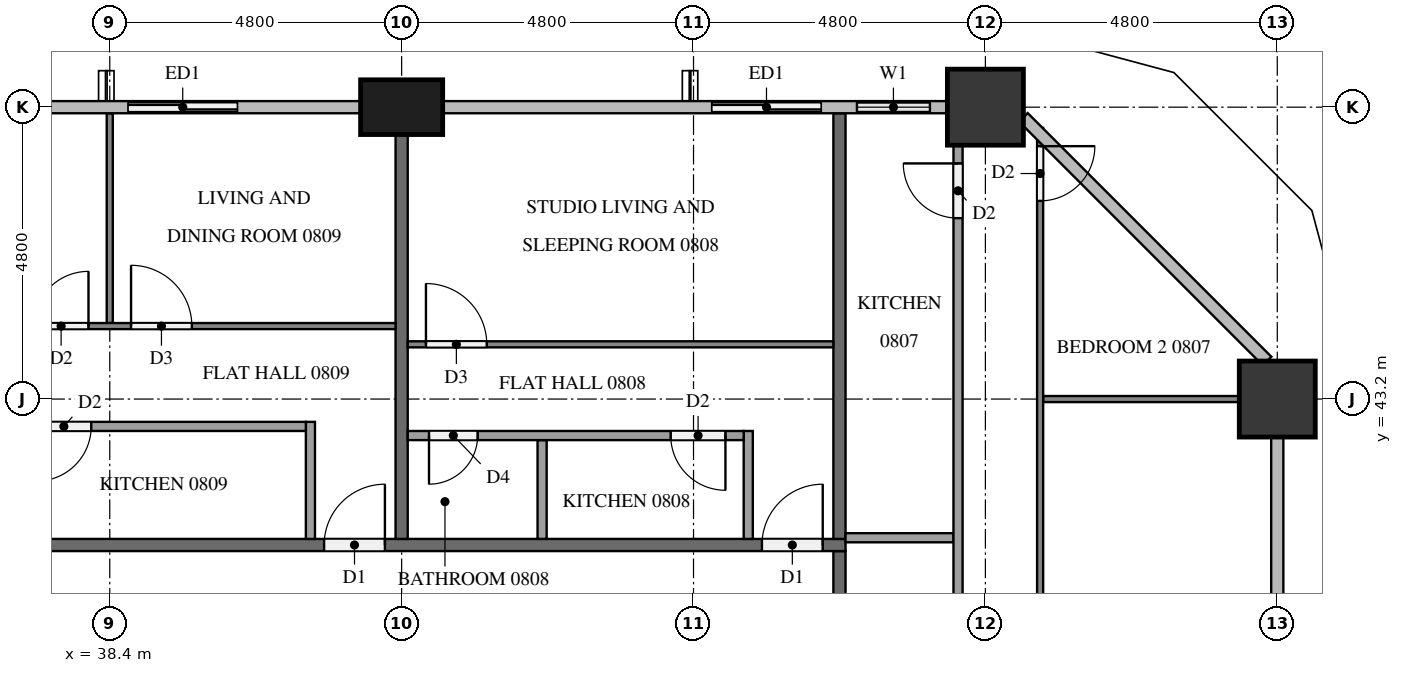
"""IFC4 building model, lengths in metres.
Left out: names, types, materials, properties, quantities, classifications, styles, units other than length and angle.
Written with IfcOpenShell. Run it as: python <this file> out.ifc"""

import sys

from ifc_helpers import new_model, si_unit, direction, frame, frame_2d, origin, origin_2d, place, context, subcontext, project, spatial, rectangle, extrude, element, fill, save


model = new_model("IFC4")
c1 = context("Model", 3, precision=1e-05, world=origin(), true_north=direction((0.0, 1.0)))
c2 = subcontext(c1, "Body", "Model", "MODEL_VIEW")
j1 = project(units=[si_unit("LENGTHUNIT", "METRE"), si_unit("PLANEANGLEUNIT", "RADIAN")], contexts=[c1])
p1 = place(None, origin())
s1 = spatial("IfcSite", under=j1, at=p1, CompositionType="ELEMENT")
p2 = place(p1, origin())
s2 = spatial("IfcBuilding", under=s1, at=p2, CompositionType="ELEMENT")
p3 = place(p2, frame((0.0, 0.0, 36.4)))
s3 = spatial("IfcBuildingStorey", under=s2, at=p3, CompositionType="ELEMENT", Elevation=36.4)
for number, where, z_axis, x_axis in (
    (1, (57.6, 43.2, 0.0), (0.0, 0.0, 1.0), (1.0, 0.0, 0.0)),
    (2, (52.8, 48.0, 0.0), (0.0, 0.0, 1.0), (1.0, 0.0, 0.0)),
):
    element("IfcColumn", number, at=place(p3, frame(where, z_axis=z_axis, x_axis=x_axis)), inside=s3, PredefinedType="COLUMN", context=c2, shape_type="SweptSolid", body=[
        extrude(rectangle(XDim=1.25, YDim=1.25, at=origin_2d()), origin(), (0.0, 0.0, 1.0), 3.2),
    ])
p4 = place(p3, frame((43.2, 48.0, 0.0), z_axis=(0.0, 0.0, 1.0), x_axis=(1.0, 0.0, 0.0)))
e3 = element("IfcColumn", 3, at=p4, inside=s3, PredefinedType="COLUMN", context=c2, shape_type="SweptSolid", body=[
    extrude(rectangle(XDim=1.35, YDim=0.9, at=origin_2d()), origin(), (0.0, 0.0, 1.0), 3.2),
])
p5 = place(p3, frame((52.175, 48.0, 0.0), z_axis=(0.0, 0.0, 1.0), x_axis=(-1.0, 0.0, 0.0)))
e4 = element("IfcWall", 4, at=p5, inside=s3, PredefinedType="SOLIDWALL", context=c2, shape_type="SweptSolid", body=[
    extrude(rectangle(XDim=4.175, YDim=0.15, at=frame_2d((2.087, 0.0))), origin(), (0.0, 0.0, 1.0), 3.2),
])
p6 = place(p5, frame((0.288, 0.0, 0.9)))
e5 = element("IfcOpeningElement", 5, at=p6, cuts=e4, PredefinedType="OPENING", context=c2, shape_type="SweptSolid", body=[
    extrude(rectangle(XDim=1.2, YDim=1.4, at=frame_2d((0.6, 0.7))), frame((0.0, 0.085, 0.0), z_axis=(0.0, -1.0, 0.0), x_axis=(1.0, 0.0, 0.0)), (0.0, 0.0, 1.0), 0.17),
])
p7 = place(p5, frame((2.075, 0.0, 0.0)))
e6 = element("IfcOpeningElement", 6, at=p7, cuts=e4, PredefinedType="OPENING", context=c2, shape_type="SweptSolid", body=[
    extrude(rectangle(XDim=1.8, YDim=2.4, at=frame_2d((0.9, 1.2))), frame((0.0, 0.085, 0.0), z_axis=(0.0, -1.0, 0.0), x_axis=(1.0, 0.0, 0.0)), (0.0, 0.0, 1.0), 0.17),
])
p8 = place(p3, frame((40.8, 48.0, 0.0), z_axis=(0.0, 0.0, 1.0), x_axis=(-1.0, 0.0, 0.0)))
e7 = element("IfcWall", 7, at=p8, inside=s3, PredefinedType="SOLIDWALL", context=c2, shape_type="SweptSolid", body=[
    extrude(rectangle(XDim=2.4, YDim=0.15, at=frame_2d((1.2, 0.0))), origin(), (0.0, 0.0, 1.0), 3.2),
])
p9 = place(p8, frame((0.3, 0.0, 0.0)))
e8 = element("IfcOpeningElement", 8, at=p9, cuts=e7, PredefinedType="OPENING", context=c2, shape_type="SweptSolid", body=[
    extrude(rectangle(XDim=1.8, YDim=2.4, at=frame_2d((0.9, 1.2))), frame((0.0, 0.085, 0.0), z_axis=(0.0, -1.0, 0.0), x_axis=(1.0, 0.0, 0.0)), (0.0, 0.0, 1.0), 0.17),
])
p10 = place(p3, frame((50.4, 40.7, 0.0), z_axis=(0.0, 0.0, 1.0), x_axis=(0.0, -1.0, 0.0)))
e9 = element("IfcWall", 9, at=p10, inside=s3, PredefinedType="PARTITIONING", context=c2, shape_type="SweptSolid", body=[
    extrude(rectangle(XDim=28.6, YDim=0.2, at=frame_2d((14.3, 0.0))), origin(), (0.0, 0.0, 1.0), 3.2),
])
p11 = place(p10, frame((27.375, 0.0, 0.0)))
e10 = element("IfcOpeningElement", 10, at=p11, cuts=e9, PredefinedType="OPENING", context=c2, shape_type="SweptSolid", body=[
    extrude(rectangle(XDim=1.1, YDim=2.1, at=frame_2d((0.55, 1.05))), frame((0.0, 0.11, 0.0), z_axis=(0.0, -1.0, 0.0), x_axis=(1.0, 0.0, 0.0)), (0.0, 0.0, 1.0), 0.22),
])
p12 = place(p10, frame((8.225, 0.0, 0.0)))
e11 = element("IfcOpeningElement", 11, at=p12, cuts=e9, PredefinedType="OPENING", context=c2, shape_type="SweptSolid", body=[
    extrude(rectangle(XDim=1.0, YDim=2.1, at=frame_2d((0.5, 1.05))), frame((0.0, 0.11, 0.0), z_axis=(0.0, -1.0, 0.0), x_axis=(1.0, 0.0, 0.0)), (0.0, 0.0, 1.0), 0.22),
])
p13 = place(p3, frame((11.9, 40.8, 0.0), z_axis=(0.0, 0.0, 1.0), x_axis=(1.0, 0.0, 0.0)))
e12 = element("IfcWall", 12, at=p13, inside=s3, PredefinedType="PARTITIONING", context=c2, shape_type="SweptSolid", body=[
    extrude(rectangle(XDim=38.6, YDim=0.2, at=frame_2d((19.3, 0.0))), origin(), (0.0, 0.0, 1.0), 3.2),
])
p14 = place(p13, frame((37.225, 0.0, 0.0)))
e13 = element("IfcOpeningElement", 13, at=p14, cuts=e12, PredefinedType="OPENING", context=c2, shape_type="SweptSolid", body=[
    extrude(rectangle(XDim=1.0, YDim=2.1, at=frame_2d((0.5, 1.05))), frame((0.0, 0.11, 0.0), z_axis=(0.0, -1.0, 0.0), x_axis=(1.0, 0.0, 0.0)), (0.0, 0.0, 1.0), 0.22),
])
p15 = place(p13, frame((30.025, 0.0, 0.0)))
e14 = element("IfcOpeningElement", 14, at=p15, cuts=e12, PredefinedType="OPENING", context=c2, shape_type="SweptSolid", body=[
    extrude(rectangle(XDim=1.0, YDim=2.1, at=frame_2d((0.5, 1.05))), frame((0.0, 0.11, 0.0), z_axis=(0.0, -1.0, 0.0), x_axis=(1.0, 0.0, 0.0)), (0.0, 0.0, 1.0), 0.22),
])
p16 = place(p13, frame((2.725, 0.0, 0.0)))
e15 = element("IfcOpeningElement", 15, at=p16, cuts=e12, PredefinedType="OPENING", context=c2, shape_type="SweptSolid", body=[
    extrude(rectangle(XDim=1.1, YDim=2.1, at=frame_2d((0.55, 1.05))), frame((0.0, 0.11, 0.0), z_axis=(0.0, -1.0, 0.0), x_axis=(1.0, 0.0, 0.0)), (0.0, 0.0, 1.0), 0.22),
])
p17 = place(p13, frame((1.225, 0.0, 0.0)))
e16 = element("IfcOpeningElement", 16, at=p17, cuts=e12, PredefinedType="OPENING", context=c2, shape_type="SweptSolid", body=[
    extrude(rectangle(XDim=1.0, YDim=2.1, at=frame_2d((0.5, 1.05))), frame((0.0, 0.11, 0.0), z_axis=(0.0, -1.0, 0.0), x_axis=(1.0, 0.0, 0.0)), (0.0, 0.0, 1.0), 0.22),
])
p18 = place(p3, frame((50.4, 40.9, 0.0), z_axis=(0.0, 0.0, 1.0), x_axis=(0.0, 1.0, 0.0)))
e17 = element("IfcWall", 17, at=p18, inside=s3, PredefinedType="PARTITIONING", context=c2, shape_type="SweptSolid", body=[
    extrude(rectangle(XDim=7.0, YDim=0.2, at=frame_2d((3.5, 0.0))), origin(), (0.0, 0.0, 1.0), 3.2),
])
p19 = place(p3, frame((43.2, 47.55, 0.0), z_axis=(0.0, 0.0, 1.0), x_axis=(0.0, -1.0, 0.0)))
e18 = element("IfcWall", 18, at=p19, inside=s3, PredefinedType="PARTITIONING", context=c2, shape_type="SweptSolid", body=[
    extrude(rectangle(XDim=6.65, YDim=0.2, at=frame_2d((3.325, 0.0))), origin(), (0.0, 0.0, 1.0), 3.2),
])
p20 = place(p3, frame((53.75, 43.2, 0.0), z_axis=(0.0, 0.0, 1.0), x_axis=(1.0, 0.0, 0.0)))
e19 = element("IfcWall", 19, at=p20, inside=s3, PredefinedType="PARTITIONING", context=c2, shape_type="SweptSolid", body=[
    extrude(rectangle(XDim=3.225, YDim=0.1, at=frame_2d((1.613, 0.0))), origin(), (0.0, 0.0, 1.0), 3.2),
])
p21 = place(p3, frame((53.7, 47.659, 0.0), z_axis=(0.0, 0.0, 1.0), x_axis=(0.0, -1.0, 0.0)))
e20 = element("IfcWall", 20, at=p21, inside=s3, PredefinedType="PARTITIONING", context=c2, shape_type="SweptSolid", body=[
    extrude(rectangle(XDim=16.359, YDim=0.1, at=frame_2d((8.179, 0.0))), origin(), (0.0, 0.0, 1.0), 3.2),
])
p22 = place(p21, frame((12.009, 0.0, 0.0)))
e21 = element("IfcOpeningElement", 21, at=p22, cuts=e20, PredefinedType="OPENING", context=c2, shape_type="SweptSolid", body=[
    extrude(rectangle(XDim=0.9, YDim=2.1, at=frame_2d((0.45, 1.05))), frame((0.0, 0.06, 0.0), z_axis=(0.0, -1.0, 0.0), x_axis=(1.0, 0.0, 0.0)), (0.0, 0.0, 1.0), 0.12),
])
p23 = place(p21, frame((10.309, 0.0, 0.0)))
e22 = element("IfcOpeningElement", 22, at=p23, cuts=e20, PredefinedType="OPENING", context=c2, shape_type="SweptSolid", body=[
    extrude(rectangle(XDim=1.0, YDim=2.1, at=frame_2d((0.5, 1.05))), frame((0.0, 0.06, 0.0), z_axis=(0.0, -1.0, 0.0), x_axis=(1.0, 0.0, 0.0)), (0.0, 0.0, 1.0), 0.12),
])
p24 = place(p21, frame((0.3, 0.0, 0.0)))
e23 = element("IfcOpeningElement", 23, at=p24, cuts=e20, PredefinedType="OPENING", context=c2, shape_type="SweptSolid", body=[
    extrude(rectangle(XDim=0.9, YDim=2.1, at=frame_2d((0.45, 1.05))), frame((0.0, 0.06, 0.0), z_axis=(0.0, -1.0, 0.0), x_axis=(1.0, 0.0, 0.0)), (0.0, 0.0, 1.0), 0.12),
])
p25 = place(p3, frame((50.5, 40.919, 0.0), z_axis=(0.0, 0.0, 1.0), x_axis=(1.0, 0.0, 0.0)))
e24 = element("IfcWall", 24, at=p25, inside=s3, PredefinedType="PARTITIONING", context=c2, shape_type="SweptSolid", body=[
    extrude(rectangle(XDim=1.775, YDim=0.15, at=frame_2d((0.887, 0.0))), origin(), (0.0, 0.0, 1.0), 3.2),
])
p26 = place(p3, frame((52.35, 32.775, 0.0), z_axis=(0.0, 0.0, 1.0), x_axis=(0.0, 1.0, 0.0)))
e25 = element("IfcWall", 25, at=p26, inside=s3, PredefinedType="PARTITIONING", context=c2, shape_type="SweptSolid", body=[
    extrude(rectangle(XDim=14.6, YDim=0.15, at=frame_2d((7.3, 0.0))), origin(), (0.0, 0.0, 1.0), 3.2),
])
p27 = place(p26, frame((3.429, 0.0, 0.0)))
e26 = element("IfcOpeningElement", 26, at=p27, cuts=e25, PredefinedType="OPENING", context=c2, shape_type="SweptSolid", body=[
    extrude(rectangle(XDim=0.9, YDim=2.1, at=frame_2d((0.45, 1.05))), frame((0.0, 0.085, 0.0), z_axis=(0.0, -1.0, 0.0), x_axis=(1.0, 0.0, 0.0)), (0.0, 0.0, 1.0), 0.17),
])
p28 = place(p26, frame((4.979, 0.0, 0.0)))
e27 = element("IfcOpeningElement", 27, at=p28, cuts=e25, PredefinedType="OPENING", context=c2, shape_type="SweptSolid", body=[
    extrude(rectangle(XDim=0.8, YDim=2.1, at=frame_2d((0.4, 1.05))), frame((0.0, 0.085, 0.0), z_axis=(0.0, -1.0, 0.0), x_axis=(1.0, 0.0, 0.0)), (0.0, 0.0, 1.0), 0.17),
])
p29 = place(p26, frame((13.4, 0.0, 0.0)))
e28 = element("IfcOpeningElement", 28, at=p29, cuts=e25, PredefinedType="OPENING", context=c2, shape_type="SweptSolid", body=[
    extrude(rectangle(XDim=0.9, YDim=2.1, at=frame_2d((0.45, 1.05))), frame((0.0, 0.085, 0.0), z_axis=(0.0, -1.0, 0.0), x_axis=(1.0, 0.0, 0.0)), (0.0, 0.0, 1.0), 0.17),
])
p30 = place(p3, frame((43.3, 44.1, 0.0), z_axis=(0.0, 0.0, 1.0), x_axis=(1.0, 0.0, 0.0)))
e29 = element("IfcWall", 29, at=p30, inside=s3, PredefinedType="PARTITIONING", context=c2, shape_type="SweptSolid", body=[
    extrude(rectangle(XDim=7.0, YDim=0.1, at=frame_2d((3.5, 0.0))), origin(), (0.0, 0.0, 1.0), 3.2),
])
p31 = place(p30, frame((0.3, 0.0, 0.0)))
e30 = element("IfcOpeningElement", 30, at=p31, cuts=e29, PredefinedType="OPENING", context=c2, shape_type="SweptSolid", body=[
    extrude(rectangle(XDim=1.0, YDim=2.1, at=frame_2d((0.5, 1.05))), frame((0.0, 0.06, 0.0), z_axis=(0.0, -1.0, 0.0), x_axis=(1.0, 0.0, 0.0)), (0.0, 0.0, 1.0), 0.12),
])
p32 = place(p3, frame((45.51, 40.9, 0.0), z_axis=(0.0, 0.0, 1.0), x_axis=(0.0, 1.0, 0.0)))
e31 = element("IfcWall", 31, at=p32, inside=s3, PredefinedType="PARTITIONING", context=c2, shape_type="SweptSolid", body=[
    extrude(rectangle(XDim=1.625, YDim=0.15, at=frame_2d((0.812, 0.0))), origin(), (0.0, 0.0, 1.0), 3.2),
])
p33 = place(p3, frame((48.9, 40.9, 0.0), z_axis=(0.0, 0.0, 1.0), x_axis=(0.0, 1.0, 0.0)))
e32 = element("IfcWall", 32, at=p33, inside=s3, PredefinedType="PARTITIONING", context=c2, shape_type="SweptSolid", body=[
    extrude(rectangle(XDim=1.775, YDim=0.15, at=frame_2d((0.888, 0.0))), origin(), (0.0, 0.0, 1.0), 3.2),
])
p34 = place(p3, frame((48.825, 42.6, 0.0), z_axis=(0.0, 0.0, 1.0), x_axis=(-1.0, 0.0, 0.0)))
e33 = element("IfcWall", 33, at=p34, inside=s3, PredefinedType="PARTITIONING", context=c2, shape_type="SweptSolid", body=[
    extrude(rectangle(XDim=5.525, YDim=0.15, at=frame_2d((2.762, 0.0))), origin(), (0.0, 0.0, 1.0), 3.2),
])
p35 = place(p34, frame((0.3, 0.0, 0.0)))
e34 = element("IfcOpeningElement", 34, at=p35, cuts=e33, PredefinedType="OPENING", context=c2, shape_type="SweptSolid", body=[
    extrude(rectangle(XDim=0.9, YDim=2.1, at=frame_2d((0.45, 1.05))), frame((0.0, 0.085, 0.0), z_axis=(0.0, -1.0, 0.0), x_axis=(1.0, 0.0, 0.0)), (0.0, 0.0, 1.0), 0.17),
])
p36 = place(p34, frame((4.375, 0.0, 0.0)))
e35 = element("IfcOpeningElement", 35, at=p36, cuts=e33, PredefinedType="OPENING", context=c2, shape_type="SweptSolid", body=[
    extrude(rectangle(XDim=0.8, YDim=2.1, at=frame_2d((0.4, 1.05))), frame((0.0, 0.085, 0.0), z_axis=(0.0, -1.0, 0.0), x_axis=(1.0, 0.0, 0.0)), (0.0, 0.0, 1.0), 0.17),
])
p37 = place(p3, frame((38.4, 44.45, 0.0), z_axis=(0.0, 0.0, 1.0), x_axis=(0.0, 1.0, 0.0)))
e36 = element("IfcWall", 36, at=p37, inside=s3, PredefinedType="PARTITIONING", context=c2, shape_type="SweptSolid", body=[
    extrude(rectangle(XDim=3.45, YDim=0.1, at=frame_2d((1.725, 0.0))), origin(), (0.0, 0.0, 1.0), 3.2),
])
p38 = place(p3, frame((33.7, 44.4, 0.0), z_axis=(0.0, 0.0, 1.0), x_axis=(1.0, 0.0, 0.0)))
e37 = element("IfcWall", 37, at=p38, inside=s3, PredefinedType="PARTITIONING", context=c2, shape_type="SweptSolid", body=[
    extrude(rectangle(XDim=9.4, YDim=0.1, at=frame_2d((4.7, 0.0))), origin(), (0.0, 0.0, 1.0), 3.2),
])
p39 = place(p38, frame((5.05, 0.0, 0.0)))
e38 = element("IfcOpeningElement", 38, at=p39, cuts=e37, PredefinedType="OPENING", context=c2, shape_type="SweptSolid", body=[
    extrude(rectangle(XDim=1.0, YDim=2.1, at=frame_2d((0.5, 1.05))), frame((0.0, 0.06, 0.0), z_axis=(0.0, -1.0, 0.0), x_axis=(1.0, 0.0, 0.0)), (0.0, 0.0, 1.0), 0.12),
])
p40 = place(p38, frame((3.45, 0.0, 0.0)))
e39 = element("IfcOpeningElement", 39, at=p40, cuts=e37, PredefinedType="OPENING", context=c2, shape_type="SweptSolid", body=[
    extrude(rectangle(XDim=0.9, YDim=2.1, at=frame_2d((0.45, 1.05))), frame((0.0, 0.06, 0.0), z_axis=(0.0, -1.0, 0.0), x_axis=(1.0, 0.0, 0.0)), (0.0, 0.0, 1.0), 0.12),
])
p41 = place(p3, frame((41.7, 40.9, 0.0), z_axis=(0.0, 0.0, 1.0), x_axis=(0.0, 1.0, 0.0)))
e40 = element("IfcWall", 40, at=p41, inside=s3, PredefinedType="PARTITIONING", context=c2, shape_type="SweptSolid", body=[
    extrude(rectangle(XDim=1.925, YDim=0.15, at=frame_2d((0.962, 0.0))), origin(), (0.0, 0.0, 1.0), 3.2),
])
p42 = place(p3, frame((41.625, 42.75, 0.0), z_axis=(0.0, 0.0, 1.0), x_axis=(-1.0, 0.0, 0.0)))
e41 = element("IfcWall", 41, at=p42, inside=s3, PredefinedType="PARTITIONING", context=c2, shape_type="SweptSolid", body=[
    extrude(rectangle(XDim=7.925, YDim=0.15, at=frame_2d((3.962, 0.0))), origin(), (0.0, 0.0, 1.0), 3.2),
])
p43 = place(p42, frame((3.53, 0.0, 0.0)))
e42 = element("IfcOpeningElement", 42, at=p43, cuts=e41, PredefinedType="OPENING", context=c2, shape_type="SweptSolid", body=[
    extrude(rectangle(XDim=0.9, YDim=2.1, at=frame_2d((0.45, 1.05))), frame((0.0, 0.085, 0.0), z_axis=(0.0, -1.0, 0.0), x_axis=(1.0, 0.0, 0.0)), (0.0, 0.0, 1.0), 0.17),
])
p44 = place(p42, frame((5.08, 0.0, 0.0)))
e43 = element("IfcOpeningElement", 43, at=p44, cuts=e41, PredefinedType="OPENING", context=c2, shape_type="SweptSolid", body=[
    extrude(rectangle(XDim=0.8, YDim=2.1, at=frame_2d((0.4, 1.05))), frame((0.0, 0.085, 0.0), z_axis=(0.0, -1.0, 0.0), x_axis=(1.0, 0.0, 0.0)), (0.0, 0.0, 1.0), 0.17),
])
p45 = place(p6, origin())
e44 = element("IfcWindow", 44, at=p45, inside=s3, PartitioningType="SINGLE_PANEL", PredefinedType="WINDOW", context=c2, shape_type="SweptSolid", body=[
    extrude(rectangle(XDim=1.2, YDim=1.4, at=frame_2d((0.6, 0.7))), frame((0.0, 0.03, 0.0), z_axis=(0.0, -1.0, 0.0), x_axis=(1.0, 0.0, 0.0)), (0.0, 0.0, 1.0), 0.06),
])
fill(e5, e44)
p46 = place(p7, origin())
e45 = element("IfcDoor", 45, at=p46, inside=s3, OperationType="SLIDING_TO_LEFT", PredefinedType="DOOR", context=c2, shape_type="SweptSolid", body=[
    extrude(rectangle(XDim=1.8, YDim=2.4, at=frame_2d((0.9, 1.2))), frame((0.0, 0.025, 0.0), z_axis=(0.0, -1.0, 0.0), x_axis=(1.0, 0.0, 0.0)), (0.0, 0.0, 1.0), 0.05),
])
fill(e6, e45)
p47 = place(p9, origin())
e46 = element("IfcDoor", 46, at=p47, inside=s3, OperationType="SLIDING_TO_RIGHT", PredefinedType="DOOR", context=c2, shape_type="SweptSolid", body=[
    extrude(rectangle(XDim=1.8, YDim=2.4, at=frame_2d((0.9, 1.2))), frame((0.0, 0.025, 0.0), z_axis=(0.0, -1.0, 0.0), x_axis=(1.0, 0.0, 0.0)), (0.0, 0.0, 1.0), 0.05),
])
fill(e8, e46)
p48 = place(p14, origin())
e47 = element("IfcDoor", 47, at=p48, inside=s3, OperationType="SINGLE_SWING_RIGHT", PredefinedType="DOOR", context=c2, shape_type="SweptSolid", body=[
    extrude(rectangle(XDim=1.0, YDim=2.1, at=frame_2d((0.5, 1.05))), frame((0.0, 0.025, 0.0), z_axis=(0.0, -1.0, 0.0), x_axis=(1.0, 0.0, 0.0)), (0.0, 0.0, 1.0), 0.05),
])
fill(e13, e47)
p49 = place(p15, origin())
e48 = element("IfcDoor", 48, at=p49, inside=s3, OperationType="SINGLE_SWING_RIGHT", PredefinedType="DOOR", context=c2, shape_type="SweptSolid", body=[
    extrude(rectangle(XDim=1.0, YDim=2.1, at=frame_2d((0.5, 1.05))), frame((0.0, 0.025, 0.0), z_axis=(0.0, -1.0, 0.0), x_axis=(1.0, 0.0, 0.0)), (0.0, 0.0, 1.0), 0.05),
])
fill(e14, e48)
p50 = place(p24, origin())
e49 = element("IfcDoor", 49, at=p50, inside=s3, OperationType="SINGLE_SWING_LEFT", PredefinedType="DOOR", context=c2, shape_type="SweptSolid", body=[
    extrude(rectangle(XDim=0.9, YDim=2.1, at=frame_2d((0.45, 1.05))), frame((0.0, 0.025, 0.0), z_axis=(0.0, -1.0, 0.0), x_axis=(1.0, 0.0, 0.0)), (0.0, 0.0, 1.0), 0.05),
])
fill(e23, e49)
p51 = place(p29, origin())
e50 = element("IfcDoor", 50, at=p51, inside=s3, OperationType="SINGLE_SWING_RIGHT", PredefinedType="DOOR", context=c2, shape_type="SweptSolid", body=[
    extrude(rectangle(XDim=0.9, YDim=2.1, at=frame_2d((0.45, 1.05))), frame((0.0, 0.025, 0.0), z_axis=(0.0, -1.0, 0.0), x_axis=(1.0, 0.0, 0.0)), (0.0, 0.0, 1.0), 0.05),
])
fill(e28, e50)
p52 = place(p31, origin())
e51 = element("IfcDoor", 51, at=p52, inside=s3, OperationType="SINGLE_SWING_LEFT", PredefinedType="DOOR", context=c2, shape_type="SweptSolid", body=[
    extrude(rectangle(XDim=1.0, YDim=2.1, at=frame_2d((0.5, 1.05))), frame((0.0, 0.025, 0.0), z_axis=(0.0, -1.0, 0.0), x_axis=(1.0, 0.0, 0.0)), (0.0, 0.0, 1.0), 0.05),
])
fill(e30, e51)
p53 = place(p35, origin())
e52 = element("IfcDoor", 52, at=p53, inside=s3, OperationType="SINGLE_SWING_LEFT", PredefinedType="DOOR", context=c2, shape_type="SweptSolid", body=[
    extrude(rectangle(XDim=0.9, YDim=2.1, at=frame_2d((0.45, 1.05))), frame((0.0, 0.025, 0.0), z_axis=(0.0, -1.0, 0.0), x_axis=(1.0, 0.0, 0.0)), (0.0, 0.0, 1.0), 0.05),
])
fill(e34, e52)
p54 = place(p36, origin())
e53 = element("IfcDoor", 53, at=p54, inside=s3, OperationType="SINGLE_SWING_RIGHT", PredefinedType="DOOR", context=c2, shape_type="SweptSolid", body=[
    extrude(rectangle(XDim=0.8, YDim=2.1, at=frame_2d((0.4, 1.05))), frame((0.0, 0.025, 0.0), z_axis=(0.0, -1.0, 0.0), x_axis=(1.0, 0.0, 0.0)), (0.0, 0.0, 1.0), 0.05),
])
fill(e35, e53)
p55 = place(p39, origin())
e54 = element("IfcDoor", 54, at=p55, inside=s3, OperationType="SINGLE_SWING_LEFT", PredefinedType="DOOR", context=c2, shape_type="SweptSolid", body=[
    extrude(rectangle(XDim=1.0, YDim=2.1, at=frame_2d((0.5, 1.05))), frame((0.0, 0.025, 0.0), z_axis=(0.0, -1.0, 0.0), x_axis=(1.0, 0.0, 0.0)), (0.0, 0.0, 1.0), 0.05),
])
fill(e38, e54)
p56 = place(p40, origin())
e55 = element("IfcDoor", 55, at=p56, inside=s3, OperationType="SINGLE_SWING_RIGHT", PredefinedType="DOOR", context=c2, shape_type="SweptSolid", body=[
    extrude(rectangle(XDim=0.9, YDim=2.1, at=frame_2d((0.45, 1.05))), frame((0.0, 0.025, 0.0), z_axis=(0.0, -1.0, 0.0), x_axis=(1.0, 0.0, 0.0)), (0.0, 0.0, 1.0), 0.05),
])
fill(e39, e55)
p57 = place(p43, origin())
e56 = element("IfcDoor", 56, at=p57, inside=s3, OperationType="SINGLE_SWING_RIGHT", PredefinedType="DOOR", context=c2, shape_type="SweptSolid", body=[
    extrude(rectangle(XDim=0.9, YDim=2.1, at=frame_2d((0.45, 1.05))), frame((0.0, 0.025, 0.0), z_axis=(0.0, -1.0, 0.0), x_axis=(1.0, 0.0, 0.0)), (0.0, 0.0, 1.0), 0.05),
])
fill(e42, e56)
save(model, sys.argv[1])
